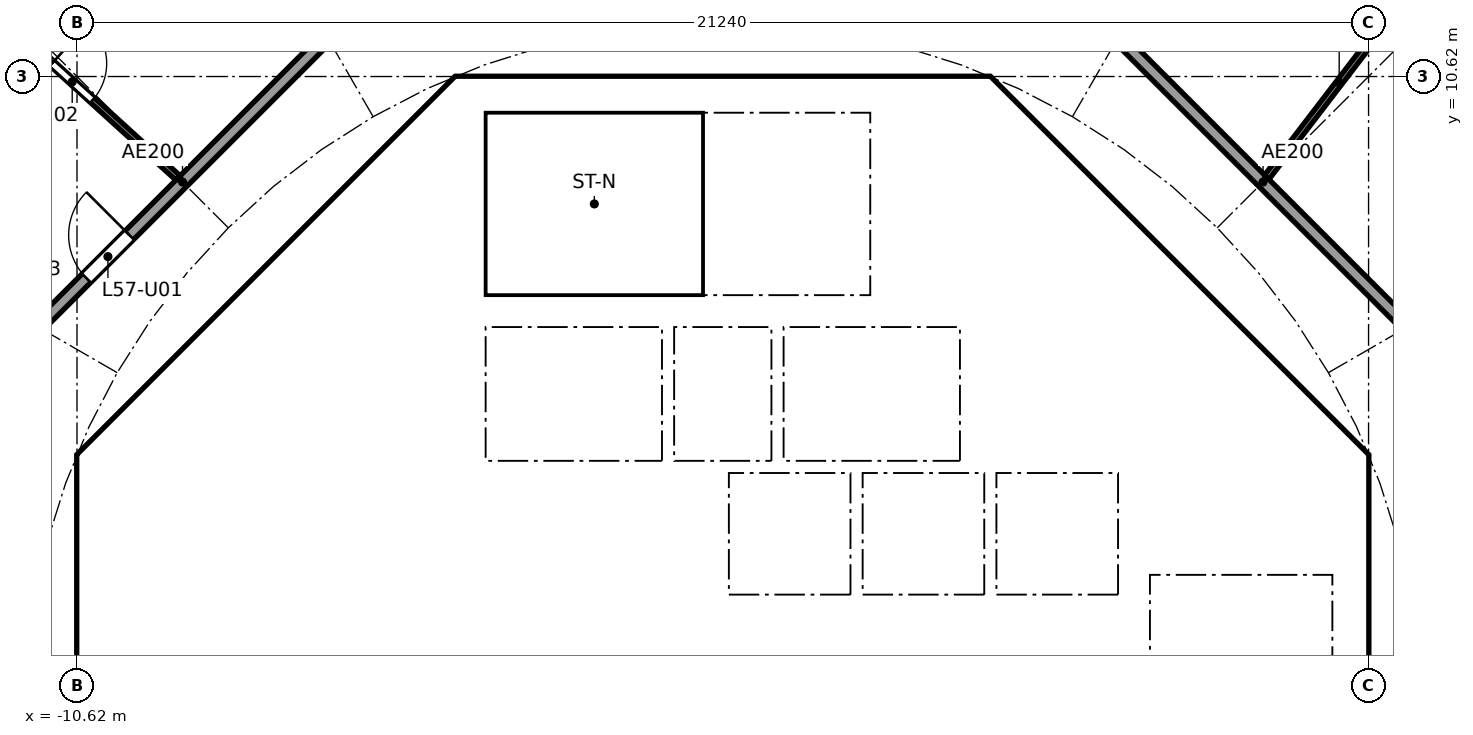
"""IFC4 building model, lengths in metres.
Left out: names, types, materials, properties, quantities, classifications, styles, units other than length and angle.
Written with IfcOpenShell. Run it as: python <this file> out.ifc"""

import sys

from ifc_helpers import new_model, si_unit, direction, frame, frame_2d, origin, place, context, subcontext, project, spatial, polyline, rectangle, outline, extrude, element, fill, save


model = new_model("IFC4")
c1 = context("Model", 3, precision=1e-05, world=origin(), true_north=direction((0.0, 1.0)))
c2 = subcontext(c1, "Body", "Model", "MODEL_VIEW")
j1 = project(units=[si_unit("LENGTHUNIT", "METRE"), si_unit("PLANEANGLEUNIT", "RADIAN")], contexts=[c1])
p1 = place(None, origin())
s1 = spatial("IfcSite", under=j1, at=p1, CompositionType="ELEMENT")
p2 = place(p1, origin())
s2 = spatial("IfcBuilding", under=s1, at=p2, CompositionType="ELEMENT")
p3 = place(p2, frame((0.0, 0.0, 227.0)))
s3 = spatial("IfcBuildingStorey", under=s2, at=p3, CompositionType="ELEMENT", Elevation=227.0)
p4 = place(p3, frame((9.988, 4.613, 0.0), z_axis=(0.0, 0.0, 1.0), x_axis=(-0.707106781187, 0.707106781187, 0.0)))
e1 = element("IfcWall", 1, at=p4, inside=s3, PredefinedType="SHEAR", context=c2, shape_type="SweptSolid", body=[
    extrude(rectangle(XDim=7.602, YDim=0.6, at=frame_2d((3.801, 0.0))), origin(), (0.0, 0.0, 1.0), 3.44),
])
p5 = place(p4, frame((3.201, 0.0, 0.0)))
e2 = element("IfcOpeningElement", 2, at=p5, cuts=e1, PredefinedType="OPENING", context=c2, shape_type="SweptSolid", body=[
    extrude(rectangle(XDim=1.2, YDim=2.1, at=frame_2d((0.6, 1.05))), frame((0.0, 0.31, 0.0), z_axis=(0.0, -1.0, 0.0), x_axis=(1.0, 0.0, 0.0)), (0.0, 0.0, 1.0), 0.62),
])
p6 = place(p3, frame((-4.613, 9.988, 0.0), z_axis=(0.0, 0.0, 1.0), x_axis=(-0.707106781187, -0.707106781187, 0.0)))
e3 = element("IfcWall", 3, at=p6, inside=s3, PredefinedType="SHEAR", context=c2, shape_type="SweptSolid", body=[
    extrude(rectangle(XDim=7.602, YDim=0.6, at=frame_2d((3.801, 0.0))), origin(), (0.0, 0.0, 1.0), 3.44),
])
p7 = place(p6, frame((0.351, 0.0, 0.0)))
e4 = element("IfcOpeningElement", 4, at=p7, cuts=e3, PredefinedType="OPENING", context=c2, shape_type="SweptSolid", body=[
    extrude(rectangle(XDim=1.1, YDim=2.1, at=frame_2d((0.55, 1.05))), frame((0.0, 0.31, 0.0), z_axis=(0.0, -1.0, 0.0), x_axis=(1.0, 0.0, 0.0)), (0.0, 0.0, 1.0), 0.62),
])
p8 = place(p3, frame((-10.325, 3.801, 0.0), z_axis=(0.0, 0.0, 1.0), x_axis=(0.0, -1.0, 0.0)))
e5 = element("IfcWall", 5, at=p8, inside=s3, PredefinedType="SHEAR", context=c2, shape_type="SweptSolid", body=[
    extrude(rectangle(XDim=7.602, YDim=0.6, at=frame_2d((3.801, 0.0))), origin(), (0.0, 0.0, 1.0), 3.44),
])
p9 = place(p8, frame((0.651, 0.0, 0.0)))
e6 = element("IfcOpeningElement", 6, at=p9, cuts=e5, PredefinedType="OPENING", context=c2, shape_type="SweptSolid", body=[
    extrude(rectangle(XDim=1.5, YDim=2.1, at=frame_2d((0.75, 1.05))), frame((0.0, 0.31, 0.0), z_axis=(0.0, -1.0, 0.0), x_axis=(1.0, 0.0, 0.0)), (0.0, 0.0, 1.0), 0.62),
])
p10 = place(p8, frame((5.451, 0.0, 0.0)))
e7 = element("IfcOpeningElement", 7, at=p10, cuts=e5, PredefinedType="OPENING", context=c2, shape_type="SweptSolid", body=[
    extrude(rectangle(XDim=1.5, YDim=2.1, at=frame_2d((0.75, 1.05))), frame((0.0, 0.31, 0.0), z_axis=(0.0, -1.0, 0.0), x_axis=(1.0, 0.0, 0.0)), (0.0, 0.0, 1.0), 0.62),
])
p11 = place(p3, frame((-6.2, 4.3, 0.0), z_axis=(0.0, 0.0, 1.0), x_axis=(0.0, 1.0, 0.0)))
e8 = element("IfcWall", 8, at=p11, inside=s3, PredefinedType="PARTITIONING", context=c2, shape_type="SweptSolid", body=[
    extrude(rectangle(XDim=3.527, YDim=0.15, at=frame_2d((1.763, 0.0))), origin(), (0.0, 0.0, 1.0), 3.44),
])
p12 = place(p11, frame((0.262, 0.0, 0.0)))
e9 = element("IfcOpeningElement", 9, at=p12, cuts=e8, PredefinedType="OPENING", context=c2, shape_type="SweptSolid", body=[
    extrude(rectangle(XDim=0.9, YDim=2.1, at=frame_2d((0.45, 1.05))), frame((0.0, 0.085, 0.0), z_axis=(0.0, -1.0, 0.0), x_axis=(1.0, 0.0, 0.0)), (0.0, 0.0, 1.0), 0.17),
])
p13 = place(p11, frame((2.138, 0.0, 0.0)))
e10 = element("IfcOpeningElement", 10, at=p13, cuts=e8, PredefinedType="OPENING", context=c2, shape_type="SweptSolid", body=[
    extrude(rectangle(XDim=0.9, YDim=2.1, at=frame_2d((0.45, 1.05))), frame((0.0, 0.085, 0.0), z_axis=(0.0, -1.0, 0.0), x_axis=(1.0, 0.0, 0.0)), (0.0, 0.0, 1.0), 0.17),
])
p14 = place(p3, frame((4.0, 4.3, 0.0), z_axis=(0.0, 0.0, 1.0), x_axis=(0.0, 1.0, 0.0)))
e11 = element("IfcWall", 11, at=p14, inside=s3, PredefinedType="SOLIDWALL", context=c2, shape_type="SweptSolid", body=[
    extrude(rectangle(XDim=2.2, YDim=0.2, at=frame_2d((1.1, 0.0))), origin(), (0.0, 0.0, 1.0), 3.44),
])
p15 = place(p14, frame((0.55, 0.0, 0.0)))
e12 = element("IfcOpeningElement", 12, at=p15, cuts=e11, PredefinedType="OPENING", context=c2, shape_type="SweptSolid", body=[
    extrude(rectangle(XDim=1.1, YDim=2.1, at=frame_2d((0.55, 1.05))), frame((0.0, 0.11, 0.0), z_axis=(0.0, -1.0, 0.0), x_axis=(1.0, 0.0, 0.0)), (0.0, 0.0, 1.0), 0.22),
])
p16 = place(p3, frame((-4.0, 4.3, 0.0), z_axis=(0.0, 0.0, 1.0), x_axis=(0.0, 1.0, 0.0)))
e13 = element("IfcWall", 13, at=p16, inside=s3, PredefinedType="SOLIDWALL", context=c2, shape_type="SweptSolid", body=[
    extrude(rectangle(XDim=2.2, YDim=0.2, at=frame_2d((1.1, 0.0))), origin(), (0.0, 0.0, 1.0), 3.44),
])
p17 = place(p16, frame((0.55, 0.0, 0.0)))
e14 = element("IfcOpeningElement", 14, at=p17, cuts=e13, PredefinedType="OPENING", context=c2, shape_type="SweptSolid", body=[
    extrude(rectangle(XDim=1.1, YDim=2.1, at=frame_2d((0.55, 1.05))), frame((0.0, 0.11, 0.0), z_axis=(0.0, -1.0, 0.0), x_axis=(1.0, 0.0, 0.0)), (0.0, 0.0, 1.0), 0.22),
])
p18 = place(p3, frame((-6.7, 2.0, 0.0), z_axis=(0.0, 0.0, 1.0), x_axis=(1.0, 0.0, 0.0)))
e15 = element("IfcWall", 15, at=p18, inside=s3, PredefinedType="SOLIDWALL", context=c2, shape_type="SweptSolid", body=[
    extrude(rectangle(XDim=13.4, YDim=0.2, at=frame_2d((6.7, 0.0))), origin(), (0.0, 0.0, 1.0), 3.44),
])
p19 = place(p18, frame((7.25, 0.0, 0.0)))
e16 = element("IfcOpeningElement", 16, at=p19, cuts=e15, PredefinedType="OPENING", context=c2, shape_type="SweptSolid", body=[
    extrude(rectangle(XDim=1.1, YDim=2.1, at=frame_2d((0.55, 1.05))), frame((0.0, 0.11, 0.0), z_axis=(0.0, -1.0, 0.0), x_axis=(1.0, 0.0, 0.0)), (0.0, 0.0, 1.0), 0.22),
])
p20 = place(p18, frame((9.45, 0.0, 0.0)))
e17 = element("IfcOpeningElement", 17, at=p20, cuts=e15, PredefinedType="OPENING", context=c2, shape_type="SweptSolid", body=[
    extrude(rectangle(XDim=1.1, YDim=2.1, at=frame_2d((0.55, 1.05))), frame((0.0, 0.11, 0.0), z_axis=(0.0, -1.0, 0.0), x_axis=(1.0, 0.0, 0.0)), (0.0, 0.0, 1.0), 0.22),
])
p21 = place(p18, frame((1.85, 0.0, 0.0)))
e18 = element("IfcOpeningElement", 18, at=p21, cuts=e15, PredefinedType="OPENING", context=c2, shape_type="SweptSolid", body=[
    extrude(rectangle(XDim=0.9, YDim=2.1, at=frame_2d((0.45, 1.05))), frame((0.0, 0.11, 0.0), z_axis=(0.0, -1.0, 0.0), x_axis=(1.0, 0.0, 0.0)), (0.0, 0.0, 1.0), 0.22),
])
p22 = place(p18, frame((5.15, 0.0, 0.0)))
e19 = element("IfcOpeningElement", 19, at=p22, cuts=e15, PredefinedType="OPENING", context=c2, shape_type="SweptSolid", body=[
    extrude(rectangle(XDim=0.9, YDim=2.1, at=frame_2d((0.45, 1.05))), frame((0.0, 0.11, 0.0), z_axis=(0.0, -1.0, 0.0), x_axis=(1.0, 0.0, 0.0)), (0.0, 0.0, 1.0), 0.22),
])
p23 = place(p3, frame((6.7, 4.0, 0.0), z_axis=(0.0, 0.0, 1.0), x_axis=(1.0, 0.0, 0.0)))
e20 = element("IfcWall", 20, at=p23, inside=s3, PredefinedType="SOLIDWALL", context=c2, shape_type="SweptSolid", body=[
    extrude(rectangle(XDim=3.325, YDim=0.2, at=frame_2d((1.662, 0.0))), origin(), (0.0, 0.0, 1.0), 3.44),
])
p24 = place(p23, frame((1.25, 0.0, 0.0)))
e21 = element("IfcOpeningElement", 21, at=p24, cuts=e20, PredefinedType="OPENING", context=c2, shape_type="SweptSolid", body=[
    extrude(rectangle(XDim=1.1, YDim=2.1, at=frame_2d((0.55, 1.05))), frame((0.0, 0.11, 0.0), z_axis=(0.0, -1.0, 0.0), x_axis=(1.0, 0.0, 0.0)), (0.0, 0.0, 1.0), 0.22),
])
p25 = place(p3, frame((4.0, 7.025, 0.0), z_axis=(0.0, 0.0, 1.0), x_axis=(0.0, 1.0, 0.0)))
e22 = element("IfcWall", 22, at=p25, inside=s3, PredefinedType="SOLIDWALL", context=c2, shape_type="SweptSolid", body=[
    extrude(rectangle(XDim=3.0, YDim=0.2, at=frame_2d((1.5, 0.0))), origin(), (0.0, 0.0, 1.0), 3.44),
])
p26 = place(p25, frame((0.925, 0.0, 0.0)))
e23 = element("IfcOpeningElement", 23, at=p26, cuts=e22, PredefinedType="OPENING", context=c2, shape_type="SweptSolid", body=[
    extrude(rectangle(XDim=1.1, YDim=2.1, at=frame_2d((0.55, 1.05))), frame((0.0, 0.11, 0.0), z_axis=(0.0, -1.0, 0.0), x_axis=(1.0, 0.0, 0.0)), (0.0, 0.0, 1.0), 0.22),
])
p27 = place(p3, origin())
e24 = element("IfcWall", 24, at=p27, inside=s3, PredefinedType="SHEAR", context=c2, shape_type="SweptSolid", body=[
    extrude(outline(polyline([(-10.2, 4.825), (-9.776, 4.401), (-10.025, 4.152), (-10.025, 3.801), (-10.625, 3.801), (-10.625, 4.401), (-10.2, 4.825)])), origin(), (0.0, 0.0, 1.0), 3.44),
])
p28 = place(p3, origin())
e25 = element("IfcWall", 25, at=p28, inside=s3, PredefinedType="SHEAR", context=c2, shape_type="SweptSolid", body=[
    extrude(outline(polyline([(-4.152, 10.025), (-4.401, 9.776), (-4.825, 10.2), (-4.401, 10.625), (4.401, 10.625), (4.825, 10.2), (4.401, 9.776), (4.152, 10.025), (-4.152, 10.025)])), origin(), (0.0, 0.0, 1.0), 3.44),
])
p29 = place(p3, origin())
e26 = element("IfcWall", 26, at=p29, inside=s3, PredefinedType="SHEAR", context=c2, shape_type="SweptSolid", body=[
    extrude(outline(polyline([(9.776, -4.401), (10.025, -4.152), (10.025, -3.801), (10.025, 4.152), (9.776, 4.401), (10.2, 4.825), (10.625, 4.401), (10.625, -4.401), (10.2, -4.825), (9.776, -4.401)])), origin(), (0.0, 0.0, 1.0), 3.44),
])
p30 = place(p3, frame((-10.025, 4.0, 0.0), z_axis=(0.0, 0.0, 1.0), x_axis=(1.0, 0.0, 0.0)))
e27 = element("IfcWall", 27, at=p30, inside=s3, PredefinedType="PARTITIONING", context=c2, shape_type="SweptSolid", body=[
    extrude(rectangle(XDim=3.325, YDim=0.2, at=frame_2d((1.662, 0.0))), origin(), (0.0, 0.0, 1.0), 3.44),
])
p31 = place(p3, frame((-8.301, 5.8, 0.0), z_axis=(0.0, 0.0, 1.0), x_axis=(1.0, 0.0, 0.0)))
e28 = element("IfcWall", 28, at=p31, inside=s3, PredefinedType="PARTITIONING", context=c2, shape_type="SweptSolid", body=[
    extrude(rectangle(XDim=2.026, YDim=0.15, at=frame_2d((1.013, 0.0))), origin(), (0.0, 0.0, 1.0), 3.44),
])
for number, where, z_axis, x_axis in (
    (29, (-0.9, 4.3, 0.0), (0.0, 0.0, 1.0), (0.0, 1.0, 0.0)),
    (30, (0.9, 4.3, 0.0), (0.0, 0.0, 1.0), (0.0, 1.0, 0.0)),
):
    element("IfcWall", number, at=place(p3, frame(where, z_axis=z_axis, x_axis=x_axis)), inside=s3, PredefinedType="SOLIDWALL", context=c2, shape_type="SweptSolid", body=[
        extrude(rectangle(XDim=2.2, YDim=0.2, at=frame_2d((1.1, 0.0))), origin(), (0.0, 0.0, 1.0), 3.44),
    ])
p32 = place(p3, origin())
e31 = element("IfcWall", 31, at=p32, inside=s3, PredefinedType="SOLIDWALL", context=c2, shape_type="SweptSolid", body=[
    extrude(outline(polyline([(-6.7, 4.3), (6.7, 4.3), (6.7, 2.1), (6.5, 2.1), (6.5, 4.1), (4.5, 4.1), (4.5, 2.1), (4.3, 2.1), (4.3, 4.1), (2.3, 4.1), (2.3, 2.1), (2.1, 2.1), (2.1, 4.1), (0.1, 4.1), (0.1, 2.1), (-0.1, 2.1), (-0.1, 4.1), (-2.1, 4.1), (-2.1, 2.1), (-2.3, 2.1), (-2.3, 4.1), (-6.5, 4.1), (-6.5, 2.1), (-6.7, 2.1), (-6.7, 4.3)])), origin(), (0.0, 0.0, 1.0), 3.44),
])
p33 = place(p3, origin())
e32 = element("IfcWall", 32, at=p33, inside=s3, PredefinedType="SOLIDWALL", context=c2, shape_type="SweptSolid", body=[
    extrude(outline(polyline([(-3.9, 7.025), (-4.1, 7.025), (-4.1, 10.025), (-3.9, 10.025), (-3.9, 7.025)])), origin(), (0.0, 0.0, 1.0), 3.44),
])
p34 = place(p3, origin())
e33 = element("IfcWall", 33, at=p34, inside=s3, PredefinedType="SOLIDWALL", context=c2, shape_type="SweptSolid", body=[
    extrude(outline(polyline([(4.1, 6.5), (-4.1, 6.5), (-4.1, 7.025), (4.1, 7.025), (4.1, 6.5)])), origin(), (0.0, 0.0, 1.0), 3.44),
])
p35 = place(p3, origin())
e34 = element("IfcWall", 34, at=p35, inside=s3, PredefinedType="SOLIDWALL", context=c2, shape_type="SweptSolid", body=[
    extrude(outline(polyline([(7.025, -3.9), (6.7, -3.9), (6.7, 3.9), (7.025, 3.9), (7.025, -3.9)])), origin(), (0.0, 0.0, 1.0), 3.44),
])
p36 = place(p3, frame((12.635, 5.134, 0.0), z_axis=(0.0, 0.0, 1.0), x_axis=(-0.707106781187, 0.707106781187, 0.0)))
e35 = element("IfcWall", 35, at=p36, inside=s3, PredefinedType="PARTITIONING", context=c2, shape_type="SweptSolid", body=[
    extrude(rectangle(XDim=10.609, YDim=0.2, at=frame_2d((5.305, 0.0))), origin(), (0.0, 0.0, 1.0), 3.44),
])
p37 = place(p3, frame((-5.275, 12.494, 0.0), z_axis=(0.0, 0.0, 1.0), x_axis=(-0.707106781187, -0.707106781187, 0.0)))
e36 = element("IfcWall", 36, at=p37, inside=s3, PredefinedType="PARTITIONING", context=c2, shape_type="SweptSolid", body=[
    extrude(rectangle(XDim=10.209, YDim=0.2, at=frame_2d((5.104, 0.0))), origin(), (0.0, 0.0, 1.0), 3.44),
])
p38 = place(p37, frame((6.339, 0.0, 0.0)))
e37 = element("IfcOpeningElement", 37, at=p38, cuts=e36, PredefinedType="OPENING", context=c2, shape_type="SweptSolid", body=[
    extrude(rectangle(XDim=1.0, YDim=2.1, at=frame_2d((0.5, 1.05))), frame((0.0, 0.11, 0.0), z_axis=(0.0, -1.0, 0.0), x_axis=(1.0, 0.0, 0.0)), (0.0, 0.0, 1.0), 0.22),
])
p39 = place(p3, frame((12.759, 10.443, 0.0), z_axis=(0.0, 0.0, 1.0), x_axis=(-0.642225196965, 0.766516011825, 0.0)))
e38 = element("IfcWall", 38, at=p39, inside=s3, PredefinedType="PARTITIONING", context=c2, shape_type="SweptSolid", body=[
    extrude(rectangle(XDim=4.361, YDim=0.1, at=frame_2d((2.18, 0.0))), origin(), (0.0, 0.0, 1.0), 2.837),
])
p40 = place(p3, frame((8.946, 8.964, 0.0), z_axis=(0.0, 0.0, 1.0), x_axis=(0.608213063121, 0.793773815296, 0.0)))
e39 = element("IfcWall", 39, at=p40, inside=s3, PredefinedType="PARTITIONING", context=c2, shape_type="SweptSolid", body=[
    extrude(rectangle(XDim=3.918, YDim=0.1, at=frame_2d((1.959, 0.0))), origin(), (0.0, 0.0, 1.0), 2.762),
])
p41 = place(p3, frame((-8.959, 8.952, 0.0), z_axis=(0.0, 0.0, 1.0), x_axis=(-0.740140081805, 0.672452719011, 0.0)))
e40 = element("IfcWall", 40, at=p41, inside=s3, PredefinedType="PARTITIONING", context=c2, shape_type="SweptSolid", body=[
    extrude(rectangle(XDim=9.775, YDim=0.1, at=frame_2d((4.887, 0.0))), origin(), (0.0, 0.0, 1.0), 2.762),
])
p42 = place(p41, frame((1.901, 0.0, 0.0)))
e41 = element("IfcOpeningElement", 41, at=p42, cuts=e40, PredefinedType="OPENING", context=c2, shape_type="SweptSolid", body=[
    extrude(rectangle(XDim=0.9, YDim=2.1, at=frame_2d((0.45, 1.05))), frame((0.0, 0.06, 0.0), z_axis=(0.0, -1.0, 0.0), x_axis=(1.0, 0.0, 0.0)), (0.0, 0.0, 1.0), 0.12),
])
p43 = place(p41, frame((6.789, 0.0, 0.0)))
e42 = element("IfcOpeningElement", 42, at=p43, cuts=e40, PredefinedType="OPENING", context=c2, shape_type="SweptSolid", body=[
    extrude(rectangle(XDim=0.9, YDim=2.1, at=frame_2d((0.45, 1.05))), frame((0.0, 0.06, 0.0), z_axis=(0.0, -1.0, 0.0), x_axis=(1.0, 0.0, 0.0)), (0.0, 0.0, 1.0), 0.12),
])
p44 = place(p19, origin())
e43 = element("IfcDoor", 43, at=p44, inside=s3, OperationType="DOUBLE_DOOR_SLIDING", PredefinedType="DOOR", context=c2, shape_type="SweptSolid", body=[
    extrude(rectangle(XDim=1.1, YDim=2.1, at=frame_2d((0.55, 1.05))), frame((0.0, 0.025, 0.0), z_axis=(0.0, -1.0, 0.0), x_axis=(1.0, 0.0, 0.0)), (0.0, 0.0, 1.0), 0.05),
])
fill(e16, e43)
p45 = place(p20, origin())
e44 = element("IfcDoor", 44, at=p45, inside=s3, OperationType="DOUBLE_DOOR_SLIDING", PredefinedType="DOOR", context=c2, shape_type="SweptSolid", body=[
    extrude(rectangle(XDim=1.1, YDim=2.1, at=frame_2d((0.55, 1.05))), frame((0.0, 0.025, 0.0), z_axis=(0.0, -1.0, 0.0), x_axis=(1.0, 0.0, 0.0)), (0.0, 0.0, 1.0), 0.05),
])
fill(e17, e44)
p46 = place(p15, origin())
e45 = element("IfcDoor", 45, at=p46, inside=s3, OperationType="DOUBLE_DOOR_SLIDING", PredefinedType="DOOR", context=c2, shape_type="SweptSolid", body=[
    extrude(rectangle(XDim=1.1, YDim=2.1, at=frame_2d((0.55, 1.05))), frame((0.0, 0.025, 0.0), z_axis=(0.0, -1.0, 0.0), x_axis=(1.0, 0.0, 0.0)), (0.0, 0.0, 1.0), 0.05),
])
fill(e12, e45)
p47 = place(p17, origin())
e46 = element("IfcDoor", 46, at=p47, inside=s3, OperationType="DOUBLE_DOOR_SLIDING", PredefinedType="DOOR", context=c2, shape_type="SweptSolid", body=[
    extrude(rectangle(XDim=1.1, YDim=2.1, at=frame_2d((0.55, 1.05))), frame((0.0, 0.025, 0.0), z_axis=(0.0, -1.0, 0.0), x_axis=(1.0, 0.0, 0.0)), (0.0, 0.0, 1.0), 0.05),
])
fill(e14, e46)
p48 = place(p24, frame((1.1, 0.0, 0.0), x_axis=(-1.0, 0.0, 0.0)))
e47 = element("IfcDoor", 47, at=p48, inside=s3, OperationType="SINGLE_SWING_LEFT", PredefinedType="DOOR", context=c2, shape_type="SweptSolid", body=[
    extrude(rectangle(XDim=1.1, YDim=2.1, at=frame_2d((0.55, 1.05))), frame((0.0, 0.025, 0.0), z_axis=(0.0, -1.0, 0.0), x_axis=(1.0, 0.0, 0.0)), (0.0, 0.0, 1.0), 0.05),
])
fill(e21, e47)
p49 = place(p26, origin())
e48 = element("IfcDoor", 48, at=p49, inside=s3, OperationType="SINGLE_SWING_RIGHT", PredefinedType="DOOR", context=c2, shape_type="SweptSolid", body=[
    extrude(rectangle(XDim=1.1, YDim=2.1, at=frame_2d((0.55, 1.05))), frame((0.0, 0.025, 0.0), z_axis=(0.0, -1.0, 0.0), x_axis=(1.0, 0.0, 0.0)), (0.0, 0.0, 1.0), 0.05),
])
fill(e23, e48)
p50 = place(p12, origin())
e49 = element("IfcDoor", 49, at=p50, inside=s3, OperationType="SINGLE_SWING_LEFT", PredefinedType="DOOR", context=c2, shape_type="SweptSolid", body=[
    extrude(rectangle(XDim=0.9, YDim=2.1, at=frame_2d((0.45, 1.05))), frame((0.0, 0.025, 0.0), z_axis=(0.0, -1.0, 0.0), x_axis=(1.0, 0.0, 0.0)), (0.0, 0.0, 1.0), 0.05),
])
fill(e9, e49)
p51 = place(p13, origin())
e50 = element("IfcDoor", 50, at=p51, inside=s3, OperationType="SINGLE_SWING_LEFT", PredefinedType="DOOR", context=c2, shape_type="SweptSolid", body=[
    extrude(rectangle(XDim=0.9, YDim=2.1, at=frame_2d((0.45, 1.05))), frame((0.0, 0.025, 0.0), z_axis=(0.0, -1.0, 0.0), x_axis=(1.0, 0.0, 0.0)), (0.0, 0.0, 1.0), 0.05),
])
fill(e10, e50)
p52 = place(p21, origin())
e51 = element("IfcDoor", 51, at=p52, inside=s3, OperationType="SINGLE_SWING_RIGHT", PredefinedType="DOOR", context=c2, shape_type="SweptSolid", body=[
    extrude(rectangle(XDim=0.9, YDim=2.1, at=frame_2d((0.45, 1.05))), frame((0.0, 0.025, 0.0), z_axis=(0.0, -1.0, 0.0), x_axis=(1.0, 0.0, 0.0)), (0.0, 0.0, 1.0), 0.05),
])
fill(e18, e51)
p53 = place(p22, origin())
e52 = element("IfcDoor", 52, at=p53, inside=s3, OperationType="SINGLE_SWING_RIGHT", PredefinedType="DOOR", context=c2, shape_type="SweptSolid", body=[
    extrude(rectangle(XDim=0.9, YDim=2.1, at=frame_2d((0.45, 1.05))), frame((0.0, 0.025, 0.0), z_axis=(0.0, -1.0, 0.0), x_axis=(1.0, 0.0, 0.0)), (0.0, 0.0, 1.0), 0.05),
])
fill(e19, e52)
p54 = place(p5, origin())
e53 = element("IfcDoor", 53, at=p54, inside=s3, OperationType="SINGLE_SWING_LEFT", PredefinedType="DOOR", context=c2, shape_type="SweptSolid", body=[
    extrude(rectangle(XDim=1.2, YDim=2.1, at=frame_2d((0.6, 1.05))), frame((0.0, 0.025, 0.0), z_axis=(0.0, -1.0, 0.0), x_axis=(1.0, 0.0, 0.0)), (0.0, 0.0, 1.0), 0.05),
])
fill(e2, e53)
p55 = place(p9, origin())
e54 = element("IfcDoor", 54, at=p55, inside=s3, OperationType="DOUBLE_DOOR_SINGLE_SWING", PredefinedType="DOOR", context=c2, shape_type="SweptSolid", body=[
    extrude(rectangle(XDim=1.5, YDim=2.1, at=frame_2d((0.75, 1.05))), frame((0.0, 0.025, 0.0), z_axis=(0.0, -1.0, 0.0), x_axis=(1.0, 0.0, 0.0)), (0.0, 0.0, 1.0), 0.05),
])
fill(e6, e54)
p56 = place(p7, origin())
e55 = element("IfcDoor", 55, at=p56, inside=s3, OperationType="SINGLE_SWING_LEFT", PredefinedType="DOOR", context=c2, shape_type="SweptSolid", body=[
    extrude(rectangle(XDim=1.1, YDim=2.1, at=frame_2d((0.55, 1.05))), frame((0.0, 0.025, 0.0), z_axis=(0.0, -1.0, 0.0), x_axis=(1.0, 0.0, 0.0)), (0.0, 0.0, 1.0), 0.05),
])
fill(e4, e55)
p57 = place(p38, frame((1.0, 0.0, 0.0), x_axis=(-1.0, 0.0, 0.0)))
e56 = element("IfcDoor", 56, at=p57, inside=s3, OperationType="SINGLE_SWING_RIGHT", PredefinedType="DOOR", context=c2, shape_type="SweptSolid", body=[
    extrude(rectangle(XDim=1.0, YDim=2.1, at=frame_2d((0.5, 1.05))), frame((0.0, 0.025, 0.0), z_axis=(0.0, -1.0, 0.0), x_axis=(1.0, 0.0, 0.0)), (0.0, 0.0, 1.0), 0.05),
])
fill(e37, e56)
p58 = place(p42, frame((0.9, 0.0, 0.0), x_axis=(-1.0, 0.0, 0.0)))
e57 = element("IfcDoor", 57, at=p58, inside=s3, OperationType="SINGLE_SWING_LEFT", PredefinedType="DOOR", context=c2, shape_type="SweptSolid", body=[
    extrude(rectangle(XDim=0.9, YDim=2.1, at=frame_2d((0.45, 1.05))), frame((0.0, 0.025, 0.0), z_axis=(0.0, -1.0, 0.0), x_axis=(1.0, 0.0, 0.0)), (0.0, 0.0, 1.0), 0.05),
])
fill(e41, e57)
save(model, sys.argv[1])
